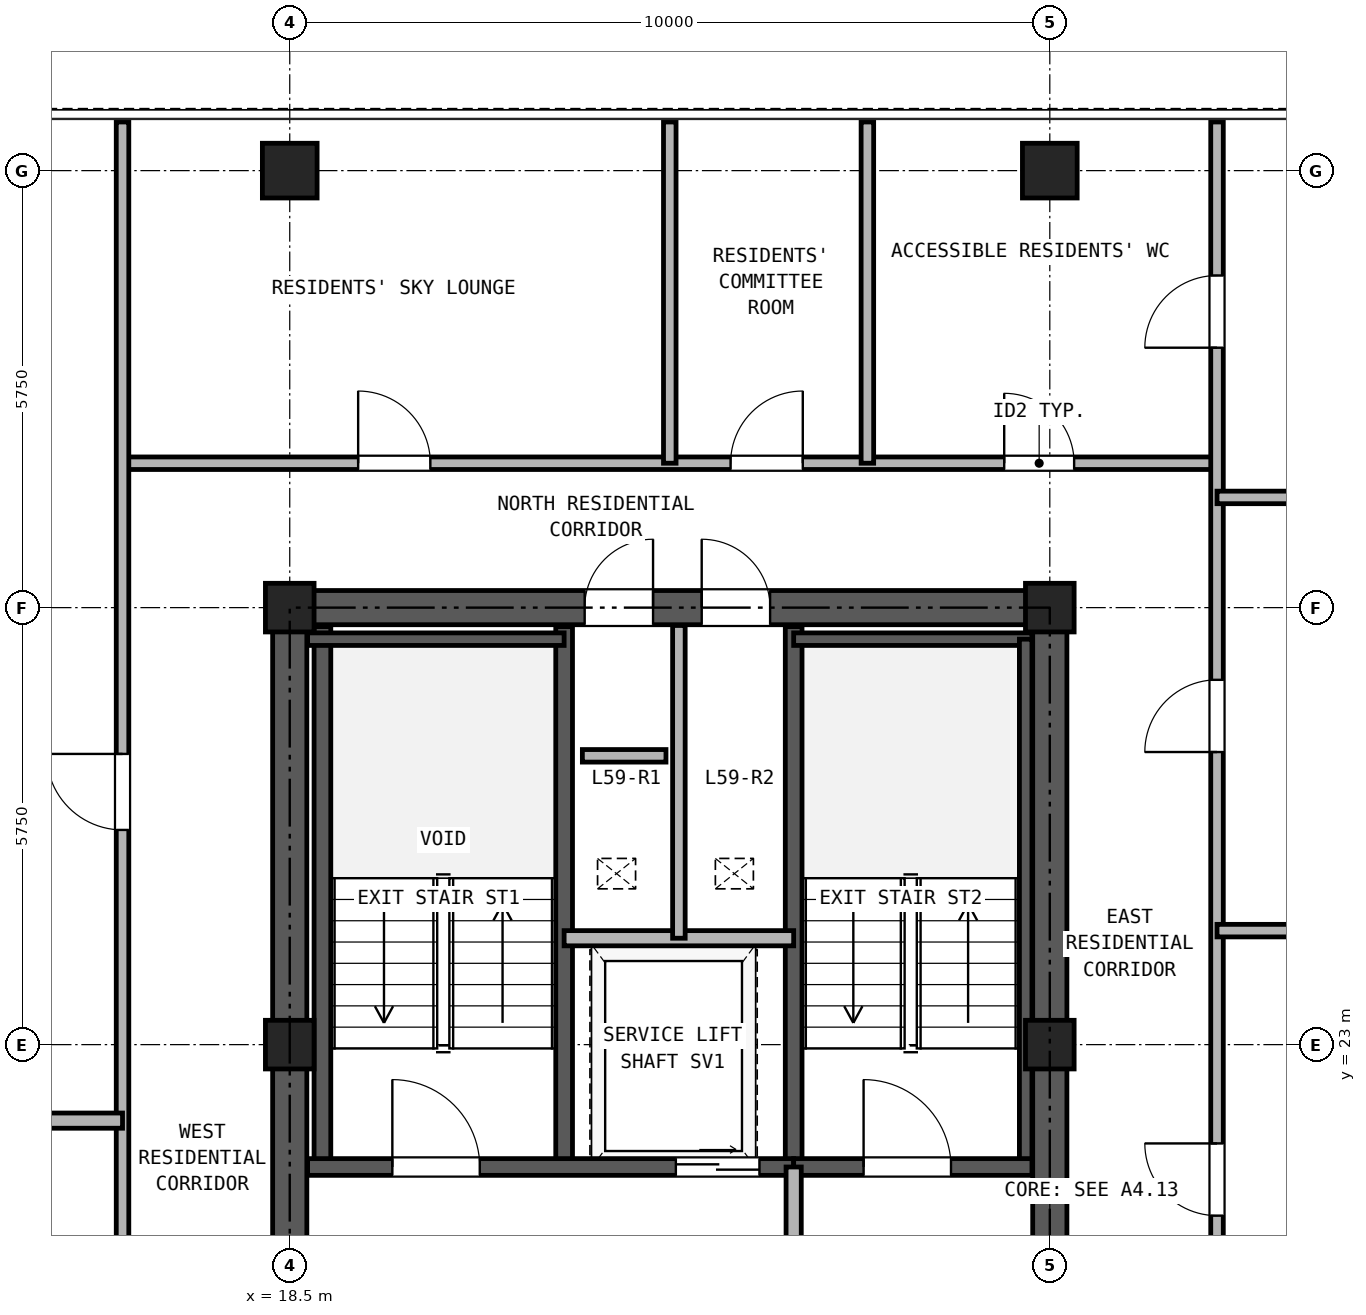
"""IFC4 building model, lengths in metres.
Left out: names, types, materials, properties, quantities, classifications, styles, units other than length and angle.
Written with IfcOpenShell. Run it as: python <this file> out.ifc"""

import sys

from ifc_helpers import new_model, si_unit, direction, frame, frame_2d, origin, origin_2d, place, context, subcontext, project, spatial, rectangle, hollow_rectangle, extrude, source, transform, mapped, element, fill, save


model = new_model("IFC4")
c1 = context("Model", 3, precision=1e-05, world=origin(), true_north=direction((0.0, 1.0)))
c2 = subcontext(c1, "Body", "Model", "MODEL_VIEW")
j1 = project(units=[si_unit("LENGTHUNIT", "METRE"), si_unit("PLANEANGLEUNIT", "RADIAN")], contexts=[c1])
p1 = place(None, origin())
s1 = spatial("IfcSite", under=j1, at=p1, CompositionType="ELEMENT")
p2 = place(p1, origin())
s2 = spatial("IfcBuilding", under=s1, at=p2, CompositionType="ELEMENT")
p3 = place(p2, frame((0.0, 0.0, 209.2)))
s3 = spatial("IfcBuildingStorey", under=s2, at=p3, CompositionType="ELEMENT", Elevation=209.2)
m1 = source(origin(), c2, "Body", "SweptSolid", [
    extrude(hollow_rectangle(XDim=0.72, YDim=0.72, WallThickness=0.04, at=origin_2d()), origin(), (0.0, 0.0, 1.0), 2.95),
])
for number, where, z_axis, x_axis in (
    (1, (18.5, 34.5, 0.0), (0.0, 0.0, 1.0), (1.0, 0.0, 0.0)),
    (2, (28.5, 34.5, 0.0), (0.0, 0.0, 1.0), (1.0, 0.0, 0.0)),
):
    element("IfcColumn", number, at=place(p3, frame(where, z_axis=z_axis, x_axis=x_axis)), inside=s3, PredefinedType="COLUMN", context=c2, shape_type="MappedRepresentation", body=[
        mapped(m1, transform((0.0, 0.0, 0.0), x_axis=(1.0, 0.0, 0.0), y_axis=(0.0, 1.0, 0.0), z_axis=(0.0, 0.0, 1.0), scale=1.0)),
    ])
m2 = source(origin(), c2, "Body", "SweptSolid", [
    extrude(hollow_rectangle(XDim=0.64, YDim=0.64, WallThickness=0.035, at=origin_2d()), origin(), (0.0, 0.0, 1.0), 2.95),
])
for number, where, z_axis, x_axis in (
    (3, (18.5, 23.0, 0.0), (0.0, 0.0, 1.0), (1.0, 0.0, 0.0)),
    (4, (18.5, 28.75, 0.0), (0.0, 0.0, 1.0), (1.0, 0.0, 0.0)),
    (5, (28.5, 23.0, 0.0), (0.0, 0.0, 1.0), (1.0, 0.0, 0.0)),
    (6, (28.5, 28.75, 0.0), (0.0, 0.0, 1.0), (1.0, 0.0, 0.0)),
):
    element("IfcColumn", number, at=place(p3, frame(where, z_axis=z_axis, x_axis=x_axis)), inside=s3, PredefinedType="COLUMN", context=c2, shape_type="MappedRepresentation", body=[
        mapped(m2, transform((0.0, 0.0, 0.0), x_axis=(1.0, 0.0, 0.0), y_axis=(0.0, 1.0, 0.0), z_axis=(0.0, 0.0, 1.0), scale=1.0)),
    ])
p4 = place(p3, frame((18.275, 28.75, 0.0), z_axis=(0.0, 0.0, 1.0), x_axis=(1.0, 0.0, 0.0)))
e7 = element("IfcWall", 7, at=p4, inside=s3, PredefinedType="SHEAR", context=c2, shape_type="SweptSolid", body=[
    extrude(rectangle(XDim=10.45, YDim=0.45, at=frame_2d((5.225, 0.0))), origin(), (0.0, 0.0, 1.0), 2.95),
])
p5 = place(p4, frame((4.105, 0.0, 0.0)))
e8 = element("IfcOpeningElement", 8, at=p5, cuts=e7, PredefinedType="OPENING", context=c2, shape_type="SweptSolid", body=[
    extrude(rectangle(XDim=0.9, YDim=2.05, at=frame_2d((0.45, 1.025))), frame((0.0, 0.235, 0.0), z_axis=(0.0, -1.0, 0.0), x_axis=(1.0, 0.0, 0.0)), (0.0, 0.0, 1.0), 0.47),
])
p6 = place(p4, frame((5.645, 0.0, 0.0)))
e9 = element("IfcOpeningElement", 9, at=p6, cuts=e7, PredefinedType="OPENING", context=c2, shape_type="SweptSolid", body=[
    extrude(rectangle(XDim=0.9, YDim=2.05, at=frame_2d((0.45, 1.025))), frame((0.0, 0.235, 0.0), z_axis=(0.0, -1.0, 0.0), x_axis=(1.0, 0.0, 0.0)), (0.0, 0.0, 1.0), 0.47),
])
p7 = place(p3, frame((18.5, 11.725, 0.0), z_axis=(0.0, 0.0, 1.0), x_axis=(0.0, 1.0, 0.0)))
e10 = element("IfcWall", 10, at=p7, inside=s3, PredefinedType="SHEAR", context=c2, shape_type="SweptSolid", body=[
    extrude(rectangle(XDim=16.8, YDim=0.45, at=frame_2d((8.4, 0.0))), origin(), (0.0, 0.0, 1.0), 2.95),
])
p8 = place(p7, frame((7.425, 0.0, 0.0)))
e11 = element("IfcOpeningElement", 11, at=p8, cuts=e10, PredefinedType="OPENING", context=c2, shape_type="SweptSolid", body=[
    extrude(rectangle(XDim=1.15, YDim=2.2, at=frame_2d((0.575, 1.1))), frame((0.0, 0.235, 0.0), z_axis=(0.0, -1.0, 0.0), x_axis=(1.0, 0.0, 0.0)), (0.0, 0.0, 1.0), 0.47),
])
p9 = place(p3, frame((28.5, 11.725, 0.0), z_axis=(0.0, 0.0, 1.0), x_axis=(0.0, 1.0, 0.0)))
e12 = element("IfcWall", 12, at=p9, inside=s3, PredefinedType="SHEAR", context=c2, shape_type="SweptSolid", body=[
    extrude(rectangle(XDim=16.8, YDim=0.45, at=frame_2d((8.4, 0.0))), origin(), (0.0, 0.0, 1.0), 2.95),
])
p10 = place(p9, frame((7.425, 0.0, 0.0)))
e13 = element("IfcOpeningElement", 13, at=p10, cuts=e12, PredefinedType="OPENING", context=c2, shape_type="SweptSolid", body=[
    extrude(rectangle(XDim=1.15, YDim=2.2, at=frame_2d((0.575, 1.1))), frame((0.0, 0.235, 0.0), z_axis=(0.0, -1.0, 0.0), x_axis=(1.0, 0.0, 0.0)), (0.0, 0.0, 1.0), 0.47),
])
for number, where, z_axis, x_axis in (
    (14, (18.93, 21.39, 0.0), (0.0, 0.0, 1.0), (0.0, 1.0, 0.0)),
    (15, (22.11, 21.39, 0.0), (0.0, 0.0, 1.0), (0.0, 1.0, 0.0)),
    (16, (25.13, 21.39, 0.0), (0.0, 0.0, 1.0), (0.0, 1.0, 0.0)),
):
    element("IfcWall", number, at=place(p3, frame(where, z_axis=z_axis, x_axis=x_axis)), inside=s3, PredefinedType="SOLIDWALL", context=c2, shape_type="SweptSolid", body=[
        extrude(rectangle(XDim=7.11, YDim=0.22, at=frame_2d((3.555, 0.0))), origin(), (0.0, 0.0, 1.0), 2.95),
    ])
p11 = place(p3, frame((18.735, 28.335, 0.0), z_axis=(0.0, 0.0, 1.0), x_axis=(1.0, 0.0, 0.0)))
e17 = element("IfcWall", 17, at=p11, inside=s3, PredefinedType="PARTITIONING", context=c2, shape_type="SweptSolid", body=[
    extrude(rectangle(XDim=3.375, YDim=0.165, at=frame_2d((1.688, 0.0))), origin(), (0.0, 0.0, 1.0), 2.95),
])
p12 = place(p3, frame((25.13, 28.335, 0.0), z_axis=(0.0, 0.0, 1.0), x_axis=(1.0, 0.0, 0.0)))
e18 = element("IfcWall", 18, at=p12, inside=s3, PredefinedType="PARTITIONING", context=c2, shape_type="SweptSolid", body=[
    extrude(rectangle(XDim=3.135, YDim=0.165, at=frame_2d((1.567, 0.0))), origin(), (0.0, 0.0, 1.0), 2.95),
])
p13 = place(p3, frame((28.183, 21.39, 0.0), z_axis=(0.0, 0.0, 1.0), x_axis=(0.0, 1.0, 0.0)))
e19 = element("IfcWall", 19, at=p13, inside=s3, PredefinedType="PARTITIONING", context=c2, shape_type="SweptSolid", body=[
    extrude(rectangle(XDim=6.945, YDim=0.165, at=frame_2d((3.473, 0.0))), origin(), (0.0, 0.0, 1.0), 2.95),
])
p14 = place(p3, frame((18.735, 21.39, 0.0), z_axis=(0.0, 0.0, 1.0), x_axis=(1.0, 0.0, 0.0)))
e20 = element("IfcWall", 20, at=p14, inside=s3, PredefinedType="SOLIDWALL", context=c2, shape_type="SweptSolid", body=[
    extrude(rectangle(XDim=6.395, YDim=0.22, at=frame_2d((3.197, 0.0))), origin(), (0.0, 0.0, 1.0), 2.95),
])
p15 = place(p14, frame((1.115, 0.0, 0.0)))
e21 = element("IfcOpeningElement", 21, at=p15, cuts=e20, PredefinedType="OPENING", context=c2, shape_type="SweptSolid", body=[
    extrude(rectangle(XDim=1.15, YDim=2.2, at=frame_2d((0.575, 1.1))), frame((0.0, 0.12, 0.0), z_axis=(0.0, -1.0, 0.0), x_axis=(1.0, 0.0, 0.0)), (0.0, 0.0, 1.0), 0.24),
])
p16 = place(p14, frame((4.845, 0.0, 0.0)))
e22 = element("IfcOpeningElement", 22, at=p16, cuts=e20, PredefinedType="OPENING", context=c2, shape_type="SweptSolid", body=[
    extrude(rectangle(XDim=1.1, YDim=2.25, at=frame_2d((0.55, 1.125))), frame((0.0, 0.12, 0.0), z_axis=(0.0, -1.0, 0.0), x_axis=(1.0, 0.0, 0.0)), (0.0, 0.0, 1.0), 0.24),
])
p17 = place(p3, frame((25.13, 21.39, 0.0), z_axis=(0.0, 0.0, 1.0), x_axis=(1.0, 0.0, 0.0)))
e23 = element("IfcWall", 23, at=p17, inside=s3, PredefinedType="SOLIDWALL", context=c2, shape_type="SweptSolid", body=[
    extrude(rectangle(XDim=3.135, YDim=0.22, at=frame_2d((1.567, 0.0))), origin(), (0.0, 0.0, 1.0), 2.95),
])
p18 = place(p17, frame((0.92, 0.0, 0.0)))
e24 = element("IfcOpeningElement", 24, at=p18, cuts=e23, PredefinedType="OPENING", context=c2, shape_type="SweptSolid", body=[
    extrude(rectangle(XDim=1.15, YDim=2.2, at=frame_2d((0.575, 1.1))), frame((0.0, 0.12, 0.0), z_axis=(0.0, -1.0, 0.0), x_axis=(1.0, 0.0, 0.0)), (0.0, 0.0, 1.0), 0.24),
])
p19 = place(p3, frame((22.11, 24.4, 0.0), z_axis=(0.0, 0.0, 1.0), x_axis=(1.0, 0.0, 0.0)))
e25 = element("IfcWall", 25, at=p19, inside=s3, PredefinedType="PARTITIONING", context=c2, shape_type="SweptSolid", body=[
    extrude(rectangle(XDim=3.02, YDim=0.2, at=frame_2d((1.51, 0.0))), origin(), (0.0, 0.0, 1.0), 2.95),
])
p20 = place(p3, frame((23.62, 24.4, 0.0), z_axis=(0.0, 0.0, 1.0), x_axis=(0.0, 1.0, 0.0)))
e26 = element("IfcWall", 26, at=p20, inside=s3, PredefinedType="PARTITIONING", context=c2, shape_type="SweptSolid", body=[
    extrude(rectangle(XDim=4.115, YDim=0.165, at=frame_2d((2.058, 0.0))), origin(), (0.0, 0.0, 1.0), 2.95),
])
p21 = place(p3, frame((25.13, 18.0, 0.0), z_axis=(0.0, 0.0, 1.0), x_axis=(0.0, 1.0, 0.0)))
e27 = element("IfcWall", 27, at=p21, inside=s3, PredefinedType="PARTITIONING", context=c2, shape_type="SweptSolid", body=[
    extrude(rectangle(XDim=3.39, YDim=0.2, at=frame_2d((1.695, 0.0))), origin(), (0.0, 0.0, 1.0), 2.95),
])
p22 = place(p21, frame((1.1, 0.0, 0.0)))
e28 = element("IfcOpeningElement", 28, at=p22, cuts=e27, PredefinedType="OPENING", context=c2, shape_type="SweptSolid", body=[
    extrude(rectangle(XDim=1.15, YDim=2.2, at=frame_2d((0.575, 1.1))), frame((0.0, 0.11, 0.0), z_axis=(0.0, -1.0, 0.0), x_axis=(1.0, 0.0, 0.0)), (0.0, 0.0, 1.0), 0.22),
])
p23 = place(p3, frame((16.3, 30.65, 0.0), z_axis=(0.0, 0.0, 1.0), x_axis=(1.0, 0.0, 0.0)))
e29 = element("IfcWall", 29, at=p23, inside=s3, PredefinedType="PARTITIONING", context=c2, shape_type="SweptSolid", body=[
    extrude(rectangle(XDim=14.4, YDim=0.165, at=frame_2d((7.2, 0.0))), origin(), (0.0, 0.0, 1.0), 2.95),
])
p24 = place(p23, frame((3.1, 0.0, 0.0)))
e30 = element("IfcOpeningElement", 30, at=p24, cuts=e29, PredefinedType="OPENING", context=c2, shape_type="SweptSolid", body=[
    extrude(rectangle(XDim=0.95, YDim=2.15, at=frame_2d((0.475, 1.075))), frame((0.0, 0.093, 0.0), z_axis=(0.0, -1.0, 0.0), x_axis=(1.0, 0.0, 0.0)), (0.0, 0.0, 1.0), 0.185),
])
p25 = place(p23, frame((8.0, 0.0, 0.0)))
e31 = element("IfcOpeningElement", 31, at=p25, cuts=e29, PredefinedType="OPENING", context=c2, shape_type="SweptSolid", body=[
    extrude(rectangle(XDim=0.95, YDim=2.15, at=frame_2d((0.475, 1.075))), frame((0.0, 0.093, 0.0), z_axis=(0.0, -1.0, 0.0), x_axis=(1.0, 0.0, 0.0)), (0.0, 0.0, 1.0), 0.185),
])
p26 = place(p23, frame((11.6, 0.0, 0.0)))
e32 = element("IfcOpeningElement", 32, at=p26, cuts=e29, PredefinedType="OPENING", context=c2, shape_type="SweptSolid", body=[
    extrude(rectangle(XDim=0.92, YDim=2.1, at=frame_2d((0.46, 1.05))), frame((0.0, 0.093, 0.0), z_axis=(0.0, -1.0, 0.0), x_axis=(1.0, 0.0, 0.0)), (0.0, 0.0, 1.0), 0.185),
])
p27 = place(p3, frame((16.3, 11.35, 0.0), z_axis=(0.0, 0.0, 1.0), x_axis=(0.0, 1.0, 0.0)))
e33 = element("IfcWall", 33, at=p27, inside=s3, PredefinedType="PARTITIONING", context=c2, shape_type="SweptSolid", body=[
    extrude(rectangle(XDim=23.79, YDim=0.165, at=frame_2d((11.895, 0.0))), origin(), (0.0, 0.0, 1.0), 2.95),
])
p28 = place(p27, frame((4.825, 0.0, 0.0)))
e34 = element("IfcOpeningElement", 34, at=p28, cuts=e33, PredefinedType="OPENING", context=c2, shape_type="SweptSolid", body=[
    extrude(rectangle(XDim=1.0, YDim=2.15, at=frame_2d((0.5, 1.075))), frame((0.0, 0.093, 0.0), z_axis=(0.0, -1.0, 0.0), x_axis=(1.0, 0.0, 0.0)), (0.0, 0.0, 1.0), 0.185),
])
p29 = place(p27, frame((14.475, 0.0, 0.0)))
e35 = element("IfcOpeningElement", 35, at=p29, cuts=e33, PredefinedType="OPENING", context=c2, shape_type="SweptSolid", body=[
    extrude(rectangle(XDim=1.0, YDim=2.15, at=frame_2d((0.5, 1.075))), frame((0.0, 0.093, 0.0), z_axis=(0.0, -1.0, 0.0), x_axis=(1.0, 0.0, 0.0)), (0.0, 0.0, 1.0), 0.185),
])
p30 = place(p3, frame((30.7, 11.35, 0.0), z_axis=(0.0, 0.0, 1.0), x_axis=(0.0, 1.0, 0.0)))
e36 = element("IfcWall", 36, at=p30, inside=s3, PredefinedType="PARTITIONING", context=c2, shape_type="SweptSolid", body=[
    extrude(rectangle(XDim=23.79, YDim=0.165, at=frame_2d((11.895, 0.0))), origin(), (0.0, 0.0, 1.0), 2.95),
])
p31 = place(p30, frame((2.825, 0.0, 0.0)))
e37 = element("IfcOpeningElement", 37, at=p31, cuts=e36, PredefinedType="OPENING", context=c2, shape_type="SweptSolid", body=[
    extrude(rectangle(XDim=0.95, YDim=2.15, at=frame_2d((0.475, 1.075))), frame((0.0, 0.093, 0.0), z_axis=(0.0, -1.0, 0.0), x_axis=(1.0, 0.0, 0.0)), (0.0, 0.0, 1.0), 0.185),
])
p32 = place(p30, frame((9.4, 0.0, 0.0)))
e38 = element("IfcOpeningElement", 38, at=p32, cuts=e36, PredefinedType="OPENING", context=c2, shape_type="SweptSolid", body=[
    extrude(rectangle(XDim=0.95, YDim=2.15, at=frame_2d((0.475, 1.075))), frame((0.0, 0.093, 0.0), z_axis=(0.0, -1.0, 0.0), x_axis=(1.0, 0.0, 0.0)), (0.0, 0.0, 1.0), 0.185),
])
p33 = place(p30, frame((15.5, 0.0, 0.0)))
e39 = element("IfcOpeningElement", 39, at=p33, cuts=e36, PredefinedType="OPENING", context=c2, shape_type="SweptSolid", body=[
    extrude(rectangle(XDim=0.95, YDim=2.15, at=frame_2d((0.475, 1.075))), frame((0.0, 0.093, 0.0), z_axis=(0.0, -1.0, 0.0), x_axis=(1.0, 0.0, 0.0)), (0.0, 0.0, 1.0), 0.185),
])
p34 = place(p30, frame((20.82, 0.0, 0.0)))
e40 = element("IfcOpeningElement", 40, at=p34, cuts=e36, PredefinedType="OPENING", context=c2, shape_type="SweptSolid", body=[
    extrude(rectangle(XDim=0.95, YDim=2.15, at=frame_2d((0.475, 1.075))), frame((0.0, 0.093, 0.0), z_axis=(0.0, -1.0, 0.0), x_axis=(1.0, 0.0, 0.0)), (0.0, 0.0, 1.0), 0.185),
])
p35 = place(p3, frame((0.16, 22.0, 0.0), z_axis=(0.0, 0.0, 1.0), x_axis=(1.0, 0.0, 0.0)))
e41 = element("IfcWall", 41, at=p35, inside=s3, PredefinedType="PARTITIONING", context=c2, shape_type="SweptSolid", body=[
    extrude(rectangle(XDim=16.14, YDim=0.2, at=frame_2d((8.07, 0.0))), origin(), (0.0, 0.0, 1.0), 2.95),
])
for number, where, z_axis, x_axis in (
    (42, (30.7, 24.5, 0.0), (0.0, 0.0, 1.0), (1.0, 0.0, 0.0)),
    (43, (30.7, 30.2, 0.0), (0.0, 0.0, 1.0), (1.0, 0.0, 0.0)),
):
    element("IfcWall", number, at=place(p3, frame(where, z_axis=z_axis, x_axis=x_axis)), inside=s3, PredefinedType="PARTITIONING", context=c2, shape_type="SweptSolid", body=[
        extrude(rectangle(XDim=10.94, YDim=0.165, at=frame_2d((5.47, 0.0))), origin(), (0.0, 0.0, 1.0), 2.95),
    ])
for number, where, z_axis, x_axis in (
    (44, (23.5, 30.65, 0.0), (0.0, 0.0, 1.0), (0.0, 1.0, 0.0)),
    (45, (26.1, 30.65, 0.0), (0.0, 0.0, 1.0), (0.0, 1.0, 0.0)),
):
    element("IfcWall", number, at=place(p3, frame(where, z_axis=z_axis, x_axis=x_axis)), inside=s3, PredefinedType="PARTITIONING", context=c2, shape_type="SweptSolid", body=[
        extrude(rectangle(XDim=4.49, YDim=0.165, at=frame_2d((2.245, 0.0))), origin(), (0.0, 0.0, 1.0), 2.95),
    ])
p36 = place(p3, frame((22.35, 26.8, 0.0), z_axis=(0.0, 0.0, 1.0), x_axis=(1.0, 0.0, 0.0)))
e46 = element("IfcWall", 46, at=p36, inside=s3, PredefinedType="PARTITIONING", context=c2, shape_type="SweptSolid", body=[
    extrude(rectangle(XDim=1.1, YDim=0.165, at=frame_2d((0.55, 0.0))), origin(), (0.0, 0.0, 1.0), 2.95),
])
p37 = place(p15, frame((1.15, 0.0, 0.0), z_axis=(0.0, 0.0, 1.0), x_axis=(-1.0, 0.0, 0.0)))
e47 = element("IfcDoor", 47, at=p37, inside=s3, OperationType="SINGLE_SWING_LEFT", PredefinedType="DOOR", context=c2, shape_type="SweptSolid", body=[
    extrude(rectangle(XDim=1.15, YDim=2.2, at=frame_2d((0.575, 1.1))), frame((0.0, 0.025, 0.0), z_axis=(0.0, -1.0, 0.0), x_axis=(1.0, 0.0, 0.0)), (0.0, 0.0, 1.0), 0.05),
])
fill(e21, e47)
p38 = place(p18, frame((1.15, 0.0, 0.0), z_axis=(0.0, 0.0, 1.0), x_axis=(-1.0, 0.0, 0.0)))
e48 = element("IfcDoor", 48, at=p38, inside=s3, OperationType="SINGLE_SWING_LEFT", PredefinedType="DOOR", context=c2, shape_type="SweptSolid", body=[
    extrude(rectangle(XDim=1.15, YDim=2.2, at=frame_2d((0.575, 1.1))), frame((0.0, 0.025, 0.0), z_axis=(0.0, -1.0, 0.0), x_axis=(1.0, 0.0, 0.0)), (0.0, 0.0, 1.0), 0.05),
])
fill(e24, e48)
p39 = place(p16, frame((1.1, 0.0, 0.0), z_axis=(0.0, 0.0, 1.0), x_axis=(-1.0, 0.0, 0.0)))
e49 = element("IfcDoor", 49, at=p39, inside=s3, OperationType="DOUBLE_DOOR_SLIDING", PredefinedType="DOOR", context=c2, shape_type="SweptSolid", body=[
    extrude(rectangle(XDim=1.1, YDim=2.25, at=frame_2d((0.55, 1.125))), frame((0.0, 0.025, 0.0), z_axis=(0.0, -1.0, 0.0), x_axis=(1.0, 0.0, 0.0)), (0.0, 0.0, 1.0), 0.05),
])
fill(e22, e49)
p40 = place(p5, origin())
e50 = element("IfcDoor", 50, at=p40, inside=s3, OperationType="SINGLE_SWING_RIGHT", PredefinedType="DOOR", context=c2, shape_type="SweptSolid", body=[
    extrude(rectangle(XDim=0.9, YDim=2.05, at=frame_2d((0.45, 1.025))), frame((0.0, 0.025, 0.0), z_axis=(0.0, -1.0, 0.0), x_axis=(1.0, 0.0, 0.0)), (0.0, 0.0, 1.0), 0.05),
])
fill(e8, e50)
p41 = place(p6, origin())
e51 = element("IfcDoor", 51, at=p41, inside=s3, OperationType="SINGLE_SWING_LEFT", PredefinedType="DOOR", context=c2, shape_type="SweptSolid", body=[
    extrude(rectangle(XDim=0.9, YDim=2.05, at=frame_2d((0.45, 1.025))), frame((0.0, 0.025, 0.0), z_axis=(0.0, -1.0, 0.0), x_axis=(1.0, 0.0, 0.0)), (0.0, 0.0, 1.0), 0.05),
])
fill(e9, e51)
p42 = place(p29, origin())
e52 = element("IfcDoor", 52, at=p42, inside=s3, OperationType="SINGLE_SWING_RIGHT", PredefinedType="DOOR", context=c2, shape_type="SweptSolid", body=[
    extrude(rectangle(XDim=1.0, YDim=2.15, at=frame_2d((0.5, 1.075))), frame((0.0, 0.025, 0.0), z_axis=(0.0, -1.0, 0.0), x_axis=(1.0, 0.0, 0.0)), (0.0, 0.0, 1.0), 0.05),
])
fill(e35, e52)
p43 = place(p32, origin())
e53 = element("IfcDoor", 53, at=p43, inside=s3, OperationType="SINGLE_SWING_RIGHT", PredefinedType="DOOR", context=c2, shape_type="SweptSolid", body=[
    extrude(rectangle(XDim=0.95, YDim=2.15, at=frame_2d((0.475, 1.075))), frame((0.0, 0.025, 0.0), z_axis=(0.0, -1.0, 0.0), x_axis=(1.0, 0.0, 0.0)), (0.0, 0.0, 1.0), 0.05),
])
fill(e38, e53)
p44 = place(p33, origin())
e54 = element("IfcDoor", 54, at=p44, inside=s3, OperationType="SINGLE_SWING_LEFT", PredefinedType="DOOR", context=c2, shape_type="SweptSolid", body=[
    extrude(rectangle(XDim=0.95, YDim=2.15, at=frame_2d((0.475, 1.075))), frame((0.0, 0.025, 0.0), z_axis=(0.0, -1.0, 0.0), x_axis=(1.0, 0.0, 0.0)), (0.0, 0.0, 1.0), 0.05),
])
fill(e39, e54)
p45 = place(p34, origin())
e55 = element("IfcDoor", 55, at=p45, inside=s3, OperationType="SINGLE_SWING_LEFT", PredefinedType="DOOR", context=c2, shape_type="SweptSolid", body=[
    extrude(rectangle(XDim=0.95, YDim=2.15, at=frame_2d((0.475, 1.075))), frame((0.0, 0.025, 0.0), z_axis=(0.0, -1.0, 0.0), x_axis=(1.0, 0.0, 0.0)), (0.0, 0.0, 1.0), 0.05),
])
fill(e40, e55)
p46 = place(p24, origin())
e56 = element("IfcDoor", 56, at=p46, inside=s3, OperationType="SINGLE_SWING_LEFT", PredefinedType="DOOR", context=c2, shape_type="SweptSolid", body=[
    extrude(rectangle(XDim=0.95, YDim=2.15, at=frame_2d((0.475, 1.075))), frame((0.0, 0.025, 0.0), z_axis=(0.0, -1.0, 0.0), x_axis=(1.0, 0.0, 0.0)), (0.0, 0.0, 1.0), 0.05),
])
fill(e30, e56)
p47 = place(p25, origin())
e57 = element("IfcDoor", 57, at=p47, inside=s3, OperationType="SINGLE_SWING_RIGHT", PredefinedType="DOOR", context=c2, shape_type="SweptSolid", body=[
    extrude(rectangle(XDim=0.95, YDim=2.15, at=frame_2d((0.475, 1.075))), frame((0.0, 0.025, 0.0), z_axis=(0.0, -1.0, 0.0), x_axis=(1.0, 0.0, 0.0)), (0.0, 0.0, 1.0), 0.05),
])
fill(e31, e57)
p48 = place(p26, origin())
e58 = element("IfcDoor", 58, at=p48, inside=s3, OperationType="SINGLE_SWING_LEFT", PredefinedType="DOOR", context=c2, shape_type="SweptSolid", body=[
    extrude(rectangle(XDim=0.92, YDim=2.1, at=frame_2d((0.46, 1.05))), frame((0.0, 0.025, 0.0), z_axis=(0.0, -1.0, 0.0), x_axis=(1.0, 0.0, 0.0)), (0.0, 0.0, 1.0), 0.05),
])
fill(e32, e58)
save(model, sys.argv[1])
